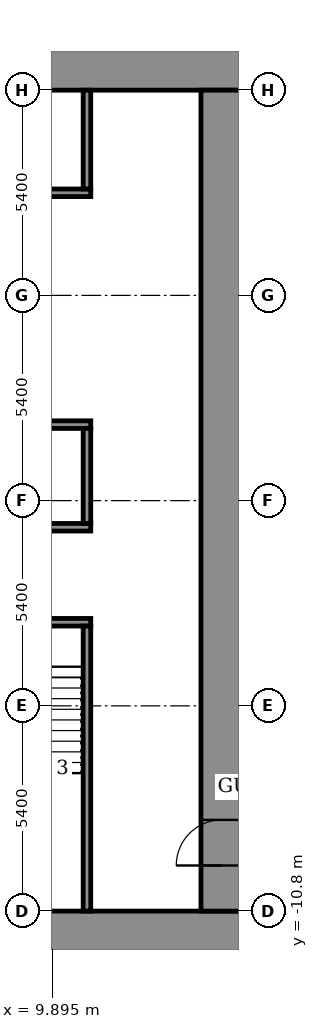
"""IFC4 building model, lengths in metres.
Left out: names, types, materials, properties, quantities, classifications, styles, units other than length and angle.
Written with IfcOpenShell. Run it as: python <this file> out.ifc"""

import sys

from ifc_helpers import new_model, si_unit, direction, frame, frame_2d, origin, place, context, subcontext, project, spatial, rectangle, extrude, element, fill, save


model = new_model("IFC4")
c1 = context("Model", 3, precision=1e-05, world=origin(), true_north=direction((0.0, 1.0)))
c2 = subcontext(c1, "Body", "Model", "MODEL_VIEW")
j1 = project(units=[si_unit("LENGTHUNIT", "METRE"), si_unit("PLANEANGLEUNIT", "RADIAN")], contexts=[c1])
p1 = place(None, origin())
s1 = spatial("IfcSite", under=j1, at=p1, CompositionType="ELEMENT")
p2 = place(p1, origin())
s2 = spatial("IfcBuilding", under=s1, at=p2, CompositionType="ELEMENT")
p3 = place(p2, frame((0.0, 0.0, 56.7)))
s3 = spatial("IfcBuildingStorey", under=s2, at=p3, CompositionType="ELEMENT", Elevation=56.7)
for number, where, z_axis, x_axis in (
    (1, (-14.9, -11.35, 0.0), (0.0, 0.0, 1.0), (1.0, 0.0, 0.0)),
    (2, (-14.9, 11.35, 0.0), (0.0, 0.0, 1.0), (1.0, 0.0, 0.0)),
):
    element("IfcWall", number, at=place(p3, frame(where, z_axis=z_axis, x_axis=x_axis)), inside=s3, PredefinedType="SHEAR", context=c2, shape_type="SweptSolid", body=[
        extrude(rectangle(XDim=29.8, YDim=1.1, at=frame_2d((14.9, 0.0))), origin(), (0.0, 0.0, 1.0), 3.6),
    ])
p4 = place(p3, frame((14.35, -10.8, 0.0), z_axis=(0.0, 0.0, 1.0), x_axis=(0.0, 1.0, 0.0)))
e3 = element("IfcWall", 3, at=p4, inside=s3, PredefinedType="SHEAR", context=c2, shape_type="SweptSolid", body=[
    extrude(rectangle(XDim=21.6, YDim=1.1, at=frame_2d((10.8, 0.0))), origin(), (0.0, 0.0, 1.0), 3.6),
])
p5 = place(p4, frame((1.2, 0.0, 0.0)))
e4 = element("IfcOpeningElement", 4, at=p5, cuts=e3, PredefinedType="OPENING", context=c2, shape_type="SweptSolid", body=[
    extrude(rectangle(XDim=1.2, YDim=2.1, at=frame_2d((0.6, 1.05))), frame((0.0, 0.56, 0.0), z_axis=(0.0, -1.0, 0.0), x_axis=(1.0, 0.0, 0.0)), (0.0, 0.0, 1.0), 1.12),
])
p6 = place(p3, frame((-10.9, -3.2, 0.0), z_axis=(0.0, 0.0, 1.0), x_axis=(1.0, 0.0, 0.0)))
e5 = element("IfcWall", 5, at=p6, inside=s3, PredefinedType="SHEAR", context=c2, shape_type="SweptSolid", body=[
    extrude(rectangle(XDim=21.8, YDim=0.2, at=frame_2d((10.9, 0.0))), origin(), (0.0, 0.0, 1.0), 3.05),
])
p7 = place(p6, frame((1.075, 0.0, 0.0)))
e6 = element("IfcOpeningElement", 6, at=p7, cuts=e5, PredefinedType="OPENING", context=c2, shape_type="SweptSolid", body=[
    extrude(rectangle(XDim=1.1, YDim=2.1, at=frame_2d((0.55, 1.05))), frame((0.0, 0.11, 0.0), z_axis=(0.0, -1.0, 0.0), x_axis=(1.0, 0.0, 0.0)), (0.0, 0.0, 1.0), 0.22),
])
p8 = place(p6, frame((10.325, 0.0, 0.0)))
e7 = element("IfcOpeningElement", 7, at=p8, cuts=e5, PredefinedType="OPENING", context=c2, shape_type="SweptSolid", body=[
    extrude(rectangle(XDim=1.1, YDim=2.1, at=frame_2d((0.55, 1.05))), frame((0.0, 0.11, 0.0), z_axis=(0.0, -1.0, 0.0), x_axis=(1.0, 0.0, 0.0)), (0.0, 0.0, 1.0), 0.22),
])
p9 = place(p6, frame((19.625, 0.0, 0.0)))
e8 = element("IfcOpeningElement", 8, at=p9, cuts=e5, PredefinedType="OPENING", context=c2, shape_type="SweptSolid", body=[
    extrude(rectangle(XDim=1.1, YDim=2.1, at=frame_2d((0.55, 1.05))), frame((0.0, 0.11, 0.0), z_axis=(0.0, -1.0, 0.0), x_axis=(1.0, 0.0, 0.0)), (0.0, 0.0, 1.0), 0.22),
])
p10 = place(p6, frame((5.7, 0.0, 0.0)))
e9 = element("IfcOpeningElement", 9, at=p10, cuts=e5, PredefinedType="OPENING", context=c2, shape_type="SweptSolid", body=[
    extrude(rectangle(XDim=1.1, YDim=2.1, at=frame_2d((0.55, 1.05))), frame((0.0, 0.11, 0.0), z_axis=(0.0, -1.0, 0.0), x_axis=(1.0, 0.0, 0.0)), (0.0, 0.0, 1.0), 0.22),
])
p11 = place(p6, frame((14.975, 0.0, 0.0)))
e10 = element("IfcOpeningElement", 10, at=p11, cuts=e5, PredefinedType="OPENING", context=c2, shape_type="SweptSolid", body=[
    extrude(rectangle(XDim=1.1, YDim=2.1, at=frame_2d((0.55, 1.05))), frame((0.0, 0.11, 0.0), z_axis=(0.0, -1.0, 0.0), x_axis=(1.0, 0.0, 0.0)), (0.0, 0.0, 1.0), 0.22),
])
p12 = place(p3, frame((-10.9, -0.7, 0.0), z_axis=(0.0, 0.0, 1.0), x_axis=(1.0, 0.0, 0.0)))
e11 = element("IfcWall", 11, at=p12, inside=s3, PredefinedType="SHEAR", context=c2, shape_type="SweptSolid", body=[
    extrude(rectangle(XDim=21.8, YDim=0.2, at=frame_2d((10.9, 0.0))), origin(), (0.0, 0.0, 1.0), 3.05),
])
p13 = place(p3, frame((-10.9, 2.0, 0.0), z_axis=(0.0, 0.0, 1.0), x_axis=(1.0, 0.0, 0.0)))
e12 = element("IfcWall", 12, at=p13, inside=s3, PredefinedType="SHEAR", context=c2, shape_type="SweptSolid", body=[
    extrude(rectangle(XDim=21.8, YDim=0.2, at=frame_2d((10.9, 0.0))), origin(), (0.0, 0.0, 1.0), 3.05),
])
p14 = place(p13, frame((0.9, 0.0, 0.0)))
e13 = element("IfcOpeningElement", 13, at=p14, cuts=e12, PredefinedType="OPENING", context=c2, shape_type="SweptSolid", body=[
    extrude(rectangle(XDim=1.1, YDim=2.1, at=frame_2d((0.55, 1.05))), frame((0.0, 0.11, 0.0), z_axis=(0.0, -1.0, 0.0), x_axis=(1.0, 0.0, 0.0)), (0.0, 0.0, 1.0), 0.22),
])
p15 = place(p13, frame((3.6, 0.0, 0.0)))
e14 = element("IfcOpeningElement", 14, at=p15, cuts=e12, PredefinedType="OPENING", context=c2, shape_type="SweptSolid", body=[
    extrude(rectangle(XDim=1.1, YDim=2.1, at=frame_2d((0.55, 1.05))), frame((0.0, 0.11, 0.0), z_axis=(0.0, -1.0, 0.0), x_axis=(1.0, 0.0, 0.0)), (0.0, 0.0, 1.0), 0.22),
])
p16 = place(p13, frame((6.3, 0.0, 0.0)))
e15 = element("IfcOpeningElement", 15, at=p16, cuts=e12, PredefinedType="OPENING", context=c2, shape_type="SweptSolid", body=[
    extrude(rectangle(XDim=1.1, YDim=2.1, at=frame_2d((0.55, 1.05))), frame((0.0, 0.11, 0.0), z_axis=(0.0, -1.0, 0.0), x_axis=(1.0, 0.0, 0.0)), (0.0, 0.0, 1.0), 0.22),
])
p17 = place(p13, frame((9.0, 0.0, 0.0)))
e16 = element("IfcOpeningElement", 16, at=p17, cuts=e12, PredefinedType="OPENING", context=c2, shape_type="SweptSolid", body=[
    extrude(rectangle(XDim=1.1, YDim=2.1, at=frame_2d((0.55, 1.05))), frame((0.0, 0.11, 0.0), z_axis=(0.0, -1.0, 0.0), x_axis=(1.0, 0.0, 0.0)), (0.0, 0.0, 1.0), 0.22),
])
p18 = place(p13, frame((11.7, 0.0, 0.0)))
e17 = element("IfcOpeningElement", 17, at=p18, cuts=e12, PredefinedType="OPENING", context=c2, shape_type="SweptSolid", body=[
    extrude(rectangle(XDim=1.1, YDim=2.1, at=frame_2d((0.55, 1.05))), frame((0.0, 0.11, 0.0), z_axis=(0.0, -1.0, 0.0), x_axis=(1.0, 0.0, 0.0)), (0.0, 0.0, 1.0), 0.22),
])
p19 = place(p13, frame((15.175, 0.0, 0.0)))
e18 = element("IfcOpeningElement", 18, at=p19, cuts=e12, PredefinedType="OPENING", context=c2, shape_type="SweptSolid", body=[
    extrude(rectangle(XDim=0.9, YDim=2.1, at=frame_2d((0.45, 1.05))), frame((0.0, 0.11, 0.0), z_axis=(0.0, -1.0, 0.0), x_axis=(1.0, 0.0, 0.0)), (0.0, 0.0, 1.0), 0.22),
])
p20 = place(p13, frame((19.225, 0.0, 0.0)))
e19 = element("IfcOpeningElement", 19, at=p20, cuts=e12, PredefinedType="OPENING", context=c2, shape_type="SweptSolid", body=[
    extrude(rectangle(XDim=0.9, YDim=2.1, at=frame_2d((0.45, 1.05))), frame((0.0, 0.11, 0.0), z_axis=(0.0, -1.0, 0.0), x_axis=(1.0, 0.0, 0.0)), (0.0, 0.0, 1.0), 0.22),
])
p21 = place(p3, frame((-10.9, 8.1, 0.0), z_axis=(0.0, 0.0, 1.0), x_axis=(1.0, 0.0, 0.0)))
e20 = element("IfcWall", 20, at=p21, inside=s3, PredefinedType="SHEAR", context=c2, shape_type="SweptSolid", body=[
    extrude(rectangle(XDim=21.8, YDim=0.2, at=frame_2d((10.9, 0.0))), origin(), (0.0, 0.0, 1.0), 3.05),
])
p22 = place(p21, frame((0.9, 0.0, 0.0)))
e21 = element("IfcOpeningElement", 21, at=p22, cuts=e20, PredefinedType="OPENING", context=c2, shape_type="SweptSolid", body=[
    extrude(rectangle(XDim=1.1, YDim=2.1, at=frame_2d((0.55, 1.05))), frame((0.0, 0.11, 0.0), z_axis=(0.0, -1.0, 0.0), x_axis=(1.0, 0.0, 0.0)), (0.0, 0.0, 1.0), 0.22),
])
p23 = place(p21, frame((3.6, 0.0, 0.0)))
e22 = element("IfcOpeningElement", 22, at=p23, cuts=e20, PredefinedType="OPENING", context=c2, shape_type="SweptSolid", body=[
    extrude(rectangle(XDim=1.1, YDim=2.1, at=frame_2d((0.55, 1.05))), frame((0.0, 0.11, 0.0), z_axis=(0.0, -1.0, 0.0), x_axis=(1.0, 0.0, 0.0)), (0.0, 0.0, 1.0), 0.22),
])
p24 = place(p21, frame((6.3, 0.0, 0.0)))
e23 = element("IfcOpeningElement", 23, at=p24, cuts=e20, PredefinedType="OPENING", context=c2, shape_type="SweptSolid", body=[
    extrude(rectangle(XDim=1.1, YDim=2.1, at=frame_2d((0.55, 1.05))), frame((0.0, 0.11, 0.0), z_axis=(0.0, -1.0, 0.0), x_axis=(1.0, 0.0, 0.0)), (0.0, 0.0, 1.0), 0.22),
])
p25 = place(p21, frame((9.0, 0.0, 0.0)))
e24 = element("IfcOpeningElement", 24, at=p25, cuts=e20, PredefinedType="OPENING", context=c2, shape_type="SweptSolid", body=[
    extrude(rectangle(XDim=1.1, YDim=2.1, at=frame_2d((0.55, 1.05))), frame((0.0, 0.11, 0.0), z_axis=(0.0, -1.0, 0.0), x_axis=(1.0, 0.0, 0.0)), (0.0, 0.0, 1.0), 0.22),
])
p26 = place(p21, frame((11.7, 0.0, 0.0)))
e25 = element("IfcOpeningElement", 25, at=p26, cuts=e20, PredefinedType="OPENING", context=c2, shape_type="SweptSolid", body=[
    extrude(rectangle(XDim=1.1, YDim=2.1, at=frame_2d((0.55, 1.05))), frame((0.0, 0.11, 0.0), z_axis=(0.0, -1.0, 0.0), x_axis=(1.0, 0.0, 0.0)), (0.0, 0.0, 1.0), 0.22),
])
p27 = place(p21, frame((15.175, 0.0, 0.0)))
e26 = element("IfcOpeningElement", 26, at=p27, cuts=e20, PredefinedType="OPENING", context=c2, shape_type="SweptSolid", body=[
    extrude(rectangle(XDim=0.9, YDim=2.1, at=frame_2d((0.45, 1.05))), frame((0.0, 0.11, 0.0), z_axis=(0.0, -1.0, 0.0), x_axis=(1.0, 0.0, 0.0)), (0.0, 0.0, 1.0), 0.22),
])
p28 = place(p21, frame((19.225, 0.0, 0.0)))
e27 = element("IfcOpeningElement", 27, at=p28, cuts=e20, PredefinedType="OPENING", context=c2, shape_type="SweptSolid", body=[
    extrude(rectangle(XDim=0.9, YDim=2.1, at=frame_2d((0.45, 1.05))), frame((0.0, 0.11, 0.0), z_axis=(0.0, -1.0, 0.0), x_axis=(1.0, 0.0, 0.0)), (0.0, 0.0, 1.0), 0.22),
])
p29 = place(p3, frame((10.8, -10.8, 0.0), z_axis=(0.0, 0.0, 1.0), x_axis=(0.0, 1.0, 0.0)))
e28 = element("IfcWall", 28, at=p29, inside=s3, PredefinedType="SHEAR", context=c2, shape_type="SweptSolid", body=[
    extrude(rectangle(XDim=7.5, YDim=0.2, at=frame_2d((3.75, 0.0))), origin(), (0.0, 0.0, 1.0), 3.05),
])
p30 = place(p3, frame((10.8, -0.6, 0.0), z_axis=(0.0, 0.0, 1.0), x_axis=(0.0, 1.0, 0.0)))
e29 = element("IfcWall", 29, at=p30, inside=s3, PredefinedType="STANDARD", context=c2, shape_type="SweptSolid", body=[
    extrude(rectangle(XDim=2.5, YDim=0.2, at=frame_2d((1.25, 0.0))), origin(), (0.0, 0.0, 1.0), 3.05),
])
p31 = place(p3, frame((10.8, 8.2, 0.0), z_axis=(0.0, 0.0, 1.0), x_axis=(0.0, 1.0, 0.0)))
e30 = element("IfcWall", 30, at=p31, inside=s3, PredefinedType="STANDARD", context=c2, shape_type="SweptSolid", body=[
    extrude(rectangle(XDim=2.6, YDim=0.2, at=frame_2d((1.3, 0.0))), origin(), (0.0, 0.0, 1.0), 3.05),
])
p32 = place(p5, origin())
e31 = element("IfcDoor", 31, at=p32, inside=s3, OperationType="DOUBLE_DOOR_SINGLE_SWING", PredefinedType="DOOR", context=c2, shape_type="SweptSolid", body=[
    extrude(rectangle(XDim=1.2, YDim=2.1, at=frame_2d((0.6, 1.05))), frame((0.0, 0.025, 0.0), z_axis=(0.0, -1.0, 0.0), x_axis=(1.0, 0.0, 0.0)), (0.0, 0.0, 1.0), 0.05),
])
fill(e4, e31)
save(model, sys.argv[1])
